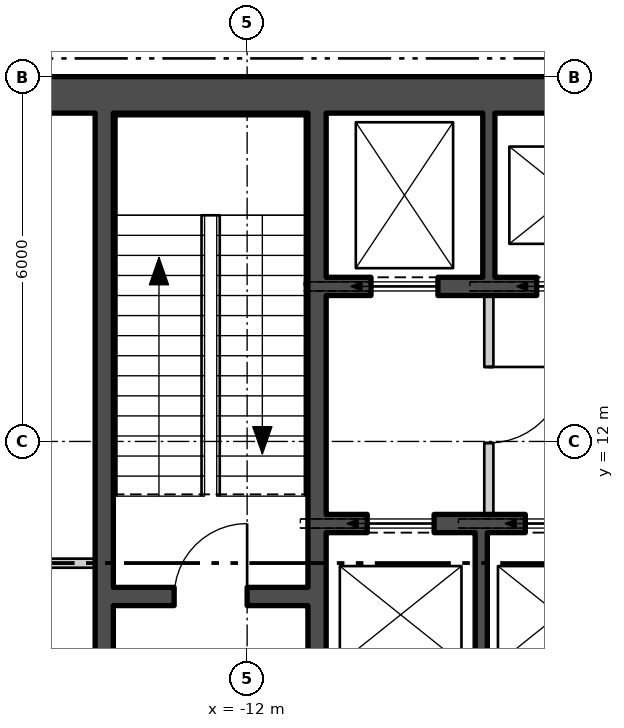
"""IFC4 building model, lengths in metres.
Left out: names, types, materials, properties, quantities, classifications, styles, units other than length and angle.
Written with IfcOpenShell. Run it as: python <this file> out.ifc"""

import sys

from ifc_helpers import new_model, si_unit, direction, frame, frame_2d, origin, place, context, subcontext, project, spatial, polyline, rectangle, outline, extrude, element, fill, save


model = new_model("IFC4")
c1 = context("Model", 3, precision=1e-05, world=origin(), true_north=direction((0.0, 1.0)))
c2 = subcontext(c1, "Body", "Model", "MODEL_VIEW")
j1 = project(units=[si_unit("LENGTHUNIT", "METRE"), si_unit("PLANEANGLEUNIT", "RADIAN")], contexts=[c1])
p1 = place(None, origin())
s1 = spatial("IfcSite", under=j1, at=p1, CompositionType="ELEMENT")
p2 = place(p1, origin())
s2 = spatial("IfcBuilding", under=s1, at=p2, CompositionType="ELEMENT")
p3 = place(p2, frame((0.0, 0.0, 28.8)))
s3 = spatial("IfcBuildingStorey", under=s2, at=p3, CompositionType="ELEMENT", Elevation=28.8)
p4 = place(p3, frame((-28.74, 9.808, -0.23), z_axis=(0.0, 0.0, 1.0), x_axis=(0.499999764979, -0.866025539474, 0.0)))
e1 = element("IfcWall", 1, at=p4, inside=s3, PredefinedType="SOLIDWALL", context=c2, shape_type="SweptSolid", body=[
    extrude(outline(polyline([(-0.13, -0.225), (45.87, -0.225), (45.61, 0.225), (0.13, 0.225), (-0.13, -0.225)])), origin(), (0.0, 0.0, 1.0), 4.55),
])
p5 = place(p4, frame((1.724, 0.0, 0.23)))
e2 = element("IfcOpeningElement", 2, at=p5, cuts=e1, PredefinedType="OPENING", context=c2, shape_type="SweptSolid", body=[
    extrude(rectangle(XDim=1.8, YDim=2.4, at=frame_2d((0.9, 1.2))), frame((0.0, 0.235, 0.0), z_axis=(0.0, -1.0, 0.0), x_axis=(1.0, 0.0, 0.0)), (0.0, 0.0, 1.0), 0.47),
])
p6 = place(p4, frame((5.893, 0.0, 1.13)))
e3 = element("IfcOpeningElement", 3, at=p6, cuts=e1, PredefinedType="OPENING", context=c2, shape_type="SweptSolid", body=[
    extrude(rectangle(XDim=2.4, YDim=2.6, at=frame_2d((1.2, 1.3))), frame((0.0, 0.235, 0.0), z_axis=(0.0, -1.0, 0.0), x_axis=(1.0, 0.0, 0.0)), (0.0, 0.0, 1.0), 0.47),
])
p7 = place(p4, frame((10.401, 0.0, 1.13)))
e4 = element("IfcOpeningElement", 4, at=p7, cuts=e1, PredefinedType="OPENING", context=c2, shape_type="SweptSolid", body=[
    extrude(rectangle(XDim=2.4, YDim=2.6, at=frame_2d((1.2, 1.3))), frame((0.0, 0.235, 0.0), z_axis=(0.0, -1.0, 0.0), x_axis=(1.0, 0.0, 0.0)), (0.0, 0.0, 1.0), 0.47),
])
p8 = place(p4, frame((14.909, 0.0, 1.13)))
e5 = element("IfcOpeningElement", 5, at=p8, cuts=e1, PredefinedType="OPENING", context=c2, shape_type="SweptSolid", body=[
    extrude(rectangle(XDim=2.4, YDim=2.6, at=frame_2d((1.2, 1.3))), frame((0.0, 0.235, 0.0), z_axis=(0.0, -1.0, 0.0), x_axis=(1.0, 0.0, 0.0)), (0.0, 0.0, 1.0), 0.47),
])
p9 = place(p4, frame((19.416, 0.0, 1.13)))
e6 = element("IfcOpeningElement", 6, at=p9, cuts=e1, PredefinedType="OPENING", context=c2, shape_type="SweptSolid", body=[
    extrude(rectangle(XDim=2.4, YDim=2.6, at=frame_2d((1.2, 1.3))), frame((0.0, 0.235, 0.0), z_axis=(0.0, -1.0, 0.0), x_axis=(1.0, 0.0, 0.0)), (0.0, 0.0, 1.0), 0.47),
])
p10 = place(p4, frame((23.924, 0.0, 1.13)))
e7 = element("IfcOpeningElement", 7, at=p10, cuts=e1, PredefinedType="OPENING", context=c2, shape_type="SweptSolid", body=[
    extrude(rectangle(XDim=2.4, YDim=2.6, at=frame_2d((1.2, 1.3))), frame((0.0, 0.235, 0.0), z_axis=(0.0, -1.0, 0.0), x_axis=(1.0, 0.0, 0.0)), (0.0, 0.0, 1.0), 0.47),
])
p11 = place(p4, frame((28.431, 0.0, 1.13)))
e8 = element("IfcOpeningElement", 8, at=p11, cuts=e1, PredefinedType="OPENING", context=c2, shape_type="SweptSolid", body=[
    extrude(rectangle(XDim=2.4, YDim=2.6, at=frame_2d((1.2, 1.3))), frame((0.0, 0.235, 0.0), z_axis=(0.0, -1.0, 0.0), x_axis=(1.0, 0.0, 0.0)), (0.0, 0.0, 1.0), 0.47),
])
p12 = place(p4, frame((33.239, 0.0, 0.23)))
e9 = element("IfcOpeningElement", 9, at=p12, cuts=e1, PredefinedType="OPENING", context=c2, shape_type="SweptSolid", body=[
    extrude(rectangle(XDim=1.8, YDim=2.4, at=frame_2d((0.9, 1.2))), frame((0.0, 0.235, 0.0), z_axis=(0.0, -1.0, 0.0), x_axis=(1.0, 0.0, 0.0)), (0.0, 0.0, 1.0), 0.47),
])
p13 = place(p4, frame((37.447, 0.0, 1.13)))
e10 = element("IfcOpeningElement", 10, at=p13, cuts=e1, PredefinedType="OPENING", context=c2, shape_type="SweptSolid", body=[
    extrude(rectangle(XDim=2.4, YDim=2.6, at=frame_2d((1.2, 1.3))), frame((0.0, 0.235, 0.0), z_axis=(0.0, -1.0, 0.0), x_axis=(1.0, 0.0, 0.0)), (0.0, 0.0, 1.0), 0.47),
])
p14 = place(p4, frame((41.916, 0.0, 1.13)))
e11 = element("IfcOpeningElement", 11, at=p14, cuts=e1, PredefinedType="OPENING", context=c2, shape_type="SweptSolid", body=[
    extrude(rectangle(XDim=2.4, YDim=2.6, at=frame_2d((1.2, 1.3))), frame((0.0, 0.235, 0.0), z_axis=(0.0, -1.0, 0.0), x_axis=(1.0, 0.0, 0.0)), (0.0, 0.0, 1.0), 0.47),
])
p15 = place(p3, frame((-17.5, 17.7, 0.0), z_axis=(0.0, 0.0, 1.0), x_axis=(1.0, 0.0, 0.0)))
e12 = element("IfcWall", 12, at=p15, inside=s3, PredefinedType="SHEAR", context=c2, shape_type="SweptSolid", body=[
    extrude(rectangle(XDim=35.0, YDim=0.6, at=frame_2d((17.5, 0.0))), origin(), (0.0, 0.0, 1.0), 4.3),
])
p16 = place(p3, frame((-10.85, 0.6, 0.0), z_axis=(0.0, 0.0, 1.0), x_axis=(0.0, 1.0, 0.0)))
e13 = element("IfcWall", 13, at=p16, inside=s3, PredefinedType="SHEAR", context=c2, shape_type="SweptSolid", body=[
    extrude(rectangle(XDim=16.8, YDim=0.3, at=frame_2d((8.4, 0.0))), origin(), (0.0, 0.0, 1.0), 4.3),
])
p17 = place(p16, frame((5.075, 0.0, 0.0)))
e14 = element("IfcOpeningElement", 14, at=p17, cuts=e13, PredefinedType="OPENING", context=c2, shape_type="SweptSolid", body=[
    extrude(rectangle(XDim=1.25, YDim=2.1, at=frame_2d((0.625, 1.05))), frame((0.0, 0.16, 0.0), z_axis=(0.0, -1.0, 0.0), x_axis=(1.0, 0.0, 0.0)), (0.0, 0.0, 1.0), 0.32),
])
p18 = place(p16, frame((1.525, 0.0, 0.0)))
e15 = element("IfcOpeningElement", 15, at=p18, cuts=e13, PredefinedType="OPENING", context=c2, shape_type="SweptSolid", body=[
    extrude(rectangle(XDim=1.0, YDim=2.1, at=frame_2d((0.5, 1.05))), frame((0.0, 0.16, 0.0), z_axis=(0.0, -1.0, 0.0), x_axis=(1.0, 0.0, 0.0)), (0.0, 0.0, 1.0), 0.32),
])
p19 = place(p3, frame((-14.35, 0.6, 0.0), z_axis=(0.0, 0.0, 1.0), x_axis=(0.0, 1.0, 0.0)))
e16 = element("IfcWall", 16, at=p19, inside=s3, PredefinedType="SHEAR", context=c2, shape_type="SweptSolid", body=[
    extrude(rectangle(XDim=16.8, YDim=0.3, at=frame_2d((8.4, 0.0))), origin(), (0.0, 0.0, 1.0), 4.3),
])
p20 = place(p19, frame((5.7, 0.0, 0.0)))
e17 = element("IfcOpeningElement", 17, at=p20, cuts=e16, PredefinedType="OPENING", context=c2, shape_type="SweptSolid", body=[
    extrude(rectangle(XDim=1.5, YDim=2.1, at=frame_2d((0.75, 1.05))), frame((0.0, 0.16, 0.0), z_axis=(0.0, -1.0, 0.0), x_axis=(1.0, 0.0, 0.0)), (0.0, 0.0, 1.0), 0.32),
])
p21 = place(p3, frame((-14.2, 9.45, 0.0), z_axis=(0.0, 0.0, 1.0), x_axis=(1.0, 0.0, 0.0)))
e18 = element("IfcWall", 18, at=p21, inside=s3, PredefinedType="SHEAR", context=c2, shape_type="SweptSolid", body=[
    extrude(rectangle(XDim=3.2, YDim=0.3, at=frame_2d((1.6, 0.0))), origin(), (0.0, 0.0, 1.0), 4.3),
])
p22 = place(p21, frame((1.0, 0.0, 0.0)))
e19 = element("IfcOpeningElement", 19, at=p22, cuts=e18, PredefinedType="OPENING", context=c2, shape_type="SweptSolid", body=[
    extrude(rectangle(XDim=1.2, YDim=2.1, at=frame_2d((0.6, 1.05))), frame((0.0, 0.16, 0.0), z_axis=(0.0, -1.0, 0.0), x_axis=(1.0, 0.0, 0.0)), (0.0, 0.0, 1.0), 0.32),
])
p23 = place(p3, frame((-10.7, 14.55, 0.0), z_axis=(0.0, 0.0, 1.0), x_axis=(1.0, 0.0, 0.0)))
e20 = element("IfcWall", 20, at=p23, inside=s3, PredefinedType="SHEAR", context=c2, shape_type="SweptSolid", body=[
    extrude(rectangle(XDim=21.4, YDim=0.3, at=frame_2d((10.7, 0.0))), origin(), (0.0, 0.0, 1.0), 4.3),
])
p24 = place(p23, frame((0.738, 0.0, 0.0)))
e21 = element("IfcOpeningElement", 21, at=p24, cuts=e20, PredefinedType="OPENING", context=c2, shape_type="SweptSolid", body=[
    extrude(rectangle(XDim=1.1, YDim=2.1, at=frame_2d((0.55, 1.05))), frame((0.0, 0.16, 0.0), z_axis=(0.0, -1.0, 0.0), x_axis=(1.0, 0.0, 0.0)), (0.0, 0.0, 1.0), 0.32),
])
p25 = place(p23, frame((3.462, 0.0, 0.0)))
e22 = element("IfcOpeningElement", 22, at=p25, cuts=e20, PredefinedType="OPENING", context=c2, shape_type="SweptSolid", body=[
    extrude(rectangle(XDim=1.1, YDim=2.1, at=frame_2d((0.55, 1.05))), frame((0.0, 0.16, 0.0), z_axis=(0.0, -1.0, 0.0), x_axis=(1.0, 0.0, 0.0)), (0.0, 0.0, 1.0), 0.32),
])
p26 = place(p23, frame((6.138, 0.0, 0.0)))
e23 = element("IfcOpeningElement", 23, at=p26, cuts=e20, PredefinedType="OPENING", context=c2, shape_type="SweptSolid", body=[
    extrude(rectangle(XDim=1.1, YDim=2.1, at=frame_2d((0.55, 1.05))), frame((0.0, 0.16, 0.0), z_axis=(0.0, -1.0, 0.0), x_axis=(1.0, 0.0, 0.0)), (0.0, 0.0, 1.0), 0.32),
])
p27 = place(p23, frame((8.812, 0.0, 0.0)))
e24 = element("IfcOpeningElement", 24, at=p27, cuts=e20, PredefinedType="OPENING", context=c2, shape_type="SweptSolid", body=[
    extrude(rectangle(XDim=1.1, YDim=2.1, at=frame_2d((0.55, 1.05))), frame((0.0, 0.16, 0.0), z_axis=(0.0, -1.0, 0.0), x_axis=(1.0, 0.0, 0.0)), (0.0, 0.0, 1.0), 0.32),
])
p28 = place(p23, frame((14.162, 0.0, 0.0)))
e25 = element("IfcOpeningElement", 25, at=p28, cuts=e20, PredefinedType="OPENING", context=c2, shape_type="SweptSolid", body=[
    extrude(rectangle(XDim=1.1, YDim=2.1, at=frame_2d((0.55, 1.05))), frame((0.0, 0.16, 0.0), z_axis=(0.0, -1.0, 0.0), x_axis=(1.0, 0.0, 0.0)), (0.0, 0.0, 1.0), 0.32),
])
p29 = place(p23, frame((16.837, 0.0, 0.0)))
e26 = element("IfcOpeningElement", 26, at=p29, cuts=e20, PredefinedType="OPENING", context=c2, shape_type="SweptSolid", body=[
    extrude(rectangle(XDim=1.1, YDim=2.1, at=frame_2d((0.55, 1.05))), frame((0.0, 0.16, 0.0), z_axis=(0.0, -1.0, 0.0), x_axis=(1.0, 0.0, 0.0)), (0.0, 0.0, 1.0), 0.32),
])
p30 = place(p23, frame((19.562, 0.0, 0.0)))
e27 = element("IfcOpeningElement", 27, at=p30, cuts=e20, PredefinedType="OPENING", context=c2, shape_type="SweptSolid", body=[
    extrude(rectangle(XDim=1.1, YDim=2.1, at=frame_2d((0.55, 1.05))), frame((0.0, 0.16, 0.0), z_axis=(0.0, -1.0, 0.0), x_axis=(1.0, 0.0, 0.0)), (0.0, 0.0, 1.0), 0.32),
])
p31 = place(p3, frame((-10.7, 10.65, 0.0), z_axis=(0.0, 0.0, 1.0), x_axis=(1.0, 0.0, 0.0)))
e28 = element("IfcWall", 28, at=p31, inside=s3, PredefinedType="SHEAR", context=c2, shape_type="SweptSolid", body=[
    extrude(rectangle(XDim=10.3, YDim=0.3, at=frame_2d((5.15, 0.0))), origin(), (0.0, 0.0, 1.0), 4.3),
])
p32 = place(p31, frame((0.675, 0.0, 0.0)))
e29 = element("IfcOpeningElement", 29, at=p32, cuts=e28, PredefinedType="OPENING", context=c2, shape_type="SweptSolid", body=[
    extrude(rectangle(XDim=1.1, YDim=2.1, at=frame_2d((0.55, 1.05))), frame((0.0, 0.16, 0.0), z_axis=(0.0, -1.0, 0.0), x_axis=(1.0, 0.0, 0.0)), (0.0, 0.0, 1.0), 0.32),
])
p33 = place(p31, frame((3.275, 0.0, 0.0)))
e30 = element("IfcOpeningElement", 30, at=p33, cuts=e28, PredefinedType="OPENING", context=c2, shape_type="SweptSolid", body=[
    extrude(rectangle(XDim=1.1, YDim=2.1, at=frame_2d((0.55, 1.05))), frame((0.0, 0.16, 0.0), z_axis=(0.0, -1.0, 0.0), x_axis=(1.0, 0.0, 0.0)), (0.0, 0.0, 1.0), 0.32),
])
p34 = place(p31, frame((5.825, 0.0, 0.0)))
e31 = element("IfcOpeningElement", 31, at=p34, cuts=e28, PredefinedType="OPENING", context=c2, shape_type="SweptSolid", body=[
    extrude(rectangle(XDim=1.1, YDim=2.1, at=frame_2d((0.55, 1.05))), frame((0.0, 0.16, 0.0), z_axis=(0.0, -1.0, 0.0), x_axis=(1.0, 0.0, 0.0)), (0.0, 0.0, 1.0), 0.32),
])
p35 = place(p31, frame((8.375, 0.0, 0.0)))
e32 = element("IfcOpeningElement", 32, at=p35, cuts=e28, PredefinedType="OPENING", context=c2, shape_type="SweptSolid", body=[
    extrude(rectangle(XDim=1.1, YDim=2.1, at=frame_2d((0.55, 1.05))), frame((0.0, 0.16, 0.0), z_axis=(0.0, -1.0, 0.0), x_axis=(1.0, 0.0, 0.0)), (0.0, 0.0, 1.0), 0.32),
])
for number, where, z_axis, x_axis in (
    (33, (-8.025, 14.7, 0.0), (0.0, 0.0, 1.0), (0.0, 1.0, 0.0)),
    (34, (-8.15, 7.8, 0.0), (0.0, 0.0, 1.0), (0.0, 1.0, 0.0)),
):
    element("IfcWall", number, at=place(p3, frame(where, z_axis=z_axis, x_axis=x_axis)), inside=s3, PredefinedType="SHEAR", context=c2, shape_type="SweptSolid", body=[
        extrude(rectangle(XDim=2.7, YDim=0.2, at=frame_2d((1.35, 0.0))), origin(), (0.0, 0.0, 1.0), 4.3),
    ])
p36 = place(p3, frame((-8.025, 10.8, 0.0), z_axis=(0.0, 0.0, 1.0), x_axis=(0.0, 1.0, 0.0)))
e35 = element("IfcWall", 35, at=p36, inside=s3, PredefinedType="PARTITIONING", context=c2, shape_type="SweptSolid", body=[
    extrude(rectangle(XDim=3.6, YDim=0.15, at=frame_2d((1.8, 0.0))), origin(), (0.0, 0.0, 1.0), 4.3),
])
p37 = place(p36, frame((1.175, 0.0, 0.0)))
e36 = element("IfcOpeningElement", 36, at=p37, cuts=e35, PredefinedType="OPENING", context=c2, shape_type="SweptSolid", body=[
    extrude(rectangle(XDim=1.25, YDim=2.1, at=frame_2d((0.625, 1.05))), frame((0.0, 0.085, 0.0), z_axis=(0.0, -1.0, 0.0), x_axis=(1.0, 0.0, 0.0)), (0.0, 0.0, 1.0), 0.17),
])
p38 = place(p3, frame((-16.9, 9.998, 0.0), z_axis=(0.0, 0.0, 1.0), x_axis=(1.0, 0.0, 0.0)))
e37 = element("IfcWall", 37, at=p38, inside=s3, PredefinedType="PARTITIONING", context=c2, shape_type="SweptSolid", body=[
    extrude(rectangle(XDim=2.4, YDim=0.15, at=frame_2d((1.2, 0.0))), origin(), (0.0, 0.0, 1.0), 4.3),
])
p39 = place(p24, origin())
e38 = element("IfcDoor", 38, at=p39, inside=s3, OperationType="SLIDING_TO_LEFT", PredefinedType="DOOR", context=c2, shape_type="SweptSolid", body=[
    extrude(rectangle(XDim=1.1, YDim=2.1, at=frame_2d((0.55, 1.05))), frame((0.0, 0.025, 0.0), z_axis=(0.0, -1.0, 0.0), x_axis=(1.0, 0.0, 0.0)), (0.0, 0.0, 1.0), 0.05),
])
fill(e21, e38)
p40 = place(p25, origin())
e39 = element("IfcDoor", 39, at=p40, inside=s3, OperationType="SLIDING_TO_LEFT", PredefinedType="DOOR", context=c2, shape_type="SweptSolid", body=[
    extrude(rectangle(XDim=1.1, YDim=2.1, at=frame_2d((0.55, 1.05))), frame((0.0, 0.025, 0.0), z_axis=(0.0, -1.0, 0.0), x_axis=(1.0, 0.0, 0.0)), (0.0, 0.0, 1.0), 0.05),
])
fill(e22, e39)
p41 = place(p32, origin())
e40 = element("IfcDoor", 40, at=p41, inside=s3, OperationType="SLIDING_TO_LEFT", PredefinedType="DOOR", context=c2, shape_type="SweptSolid", body=[
    extrude(rectangle(XDim=1.1, YDim=2.1, at=frame_2d((0.55, 1.05))), frame((0.0, 0.025, 0.0), z_axis=(0.0, -1.0, 0.0), x_axis=(1.0, 0.0, 0.0)), (0.0, 0.0, 1.0), 0.05),
])
fill(e29, e40)
p42 = place(p33, origin())
e41 = element("IfcDoor", 41, at=p42, inside=s3, OperationType="SLIDING_TO_LEFT", PredefinedType="DOOR", context=c2, shape_type="SweptSolid", body=[
    extrude(rectangle(XDim=1.1, YDim=2.1, at=frame_2d((0.55, 1.05))), frame((0.0, 0.025, 0.0), z_axis=(0.0, -1.0, 0.0), x_axis=(1.0, 0.0, 0.0)), (0.0, 0.0, 1.0), 0.05),
])
fill(e30, e41)
p43 = place(p37, origin())
e42 = element("IfcDoor", 42, at=p43, inside=s3, OperationType="SINGLE_SWING_RIGHT", PredefinedType="DOOR", context=c2, shape_type="SweptSolid", body=[
    extrude(rectangle(XDim=1.25, YDim=2.1, at=frame_2d((0.625, 1.05))), frame((0.0, 0.025, 0.0), z_axis=(0.0, -1.0, 0.0), x_axis=(1.0, 0.0, 0.0)), (0.0, 0.0, 1.0), 0.05),
])
fill(e36, e42)
p44 = place(p22, origin())
e43 = element("IfcDoor", 43, at=p44, inside=s3, OperationType="SINGLE_SWING_LEFT", PredefinedType="DOOR", context=c2, shape_type="SweptSolid", body=[
    extrude(rectangle(XDim=1.2, YDim=2.1, at=frame_2d((0.6, 1.05))), frame((0.0, 0.025, 0.0), z_axis=(0.0, -1.0, 0.0), x_axis=(1.0, 0.0, 0.0)), (0.0, 0.0, 1.0), 0.05),
])
fill(e19, e43)
save(model, sys.argv[1])
